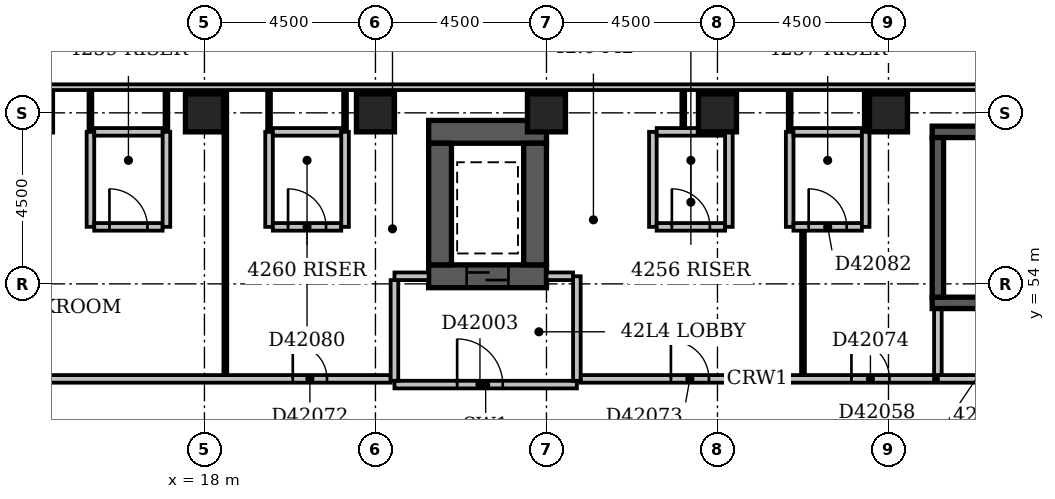
"""IFC4 building model, lengths in metres.
Left out: names, types, materials, properties, quantities, classifications, styles, units other than length and angle.
Written with IfcOpenShell. Run it as: python <this file> out.ifc"""

import sys

from ifc_helpers import new_model, si_unit, direction, frame, frame_2d, origin, origin_2d, place, context, subcontext, project, spatial, rectangle, extrude, element, fill, save


model = new_model("IFC4")
c1 = context("Model", 3, precision=1e-05, world=origin(), true_north=direction((0.0, 1.0)))
c2 = subcontext(c1, "Body", "Model", "MODEL_VIEW")
j1 = project(units=[si_unit("LENGTHUNIT", "METRE"), si_unit("PLANEANGLEUNIT", "RADIAN")], contexts=[c1])
p1 = place(None, origin())
s1 = spatial("IfcSite", under=j1, at=p1, CompositionType="ELEMENT")
p2 = place(p1, origin())
s2 = spatial("IfcBuilding", under=s1, at=p2, CompositionType="ELEMENT")
p3 = place(p2, frame((0.0, 0.0, 166.4)))
s3 = spatial("IfcBuildingStorey", under=s2, at=p3, CompositionType="ELEMENT", Elevation=166.4)
p4 = place(p3, frame((23.9, 54.2, -0.3), z_axis=(0.0, 0.0, 1.0), x_axis=(1.0, 0.0, 0.0)))
e1 = element("IfcWall", 1, at=p4, inside=s3, PredefinedType="SHEAR", context=c2, shape_type="SweptSolid", body=[
    extrude(rectangle(XDim=3.1, YDim=0.6, at=frame_2d((1.55, 0.0))), origin(), (0.0, 0.0, 1.0), 3.6),
])
p5 = place(p4, frame((1.0, 0.0, 0.3)))
e2 = element("IfcOpeningElement", 2, at=p5, cuts=e1, PredefinedType="OPENING", context=c2, shape_type="SweptSolid", body=[
    extrude(rectangle(XDim=1.1, YDim=2.1, at=frame_2d((0.55, 1.05))), frame((0.0, 0.312, 0.0), z_axis=(0.0, -1.0, 0.0), x_axis=(1.0, 0.0, 0.0)), (0.0, 0.0, 1.0), 0.624),
])
p6 = place(p3, frame((23.9, 58.0, -0.3), z_axis=(0.0, 0.0, 1.0), x_axis=(1.0, 0.0, 0.0)))
e3 = element("IfcWall", 3, at=p6, inside=s3, PredefinedType="SHEAR", context=c2, shape_type="SweptSolid", body=[
    extrude(rectangle(XDim=3.1, YDim=0.6, at=frame_2d((1.55, 0.0))), origin(), (0.0, 0.0, 1.0), 3.6),
])
for number, where, z_axis, x_axis in (
    (4, (24.2, 54.5, -0.3), (0.0, 0.0, 1.0), (0.0, 1.0, 0.0)),
    (5, (26.7, 54.5, -0.3), (0.0, 0.0, 1.0), (0.0, 1.0, 0.0)),
):
    element("IfcWall", number, at=place(p3, frame(where, z_axis=z_axis, x_axis=x_axis)), inside=s3, PredefinedType="SHEAR", context=c2, shape_type="SweptSolid", body=[
        extrude(rectangle(XDim=3.2, YDim=0.6, at=frame_2d((1.6, 0.0))), origin(), (0.0, 0.0, 1.0), 3.6),
    ])
p7 = place(p3, frame((37.15, 53.5, -0.3), z_axis=(0.0, 0.0, 1.0), x_axis=(1.0, 0.0, 0.0)))
e6 = element("IfcWall", 6, at=p7, inside=s3, PredefinedType="SHEAR", context=c2, shape_type="SweptSolid", body=[
    extrude(rectangle(XDim=7.0, YDim=0.3, at=frame_2d((3.5, 0.0))), origin(), (0.0, 0.0, 1.0), 3.6),
])
p8 = place(p7, frame((5.58, 0.0, 0.3)))
e7 = element("IfcOpeningElement", 7, at=p8, cuts=e6, PredefinedType="OPENING", context=c2, shape_type="SweptSolid", body=[
    extrude(rectangle(XDim=1.1, YDim=2.1, at=frame_2d((0.55, 1.05))), frame((0.0, 0.162, 0.0), z_axis=(0.0, -1.0, 0.0), x_axis=(1.0, 0.0, 0.0)), (0.0, 0.0, 1.0), 0.324),
])
p9 = place(p3, frame((37.15, 58.0, -0.3), z_axis=(0.0, 0.0, 1.0), x_axis=(1.0, 0.0, 0.0)))
e8 = element("IfcWall", 8, at=p9, inside=s3, PredefinedType="SHEAR", context=c2, shape_type="SweptSolid", body=[
    extrude(rectangle(XDim=7.35, YDim=0.3, at=frame_2d((3.675, 0.0))), origin(), (0.0, 0.0, 1.0), 3.6),
])
p10 = place(p3, frame((37.3, 53.65, -0.3), z_axis=(0.0, 0.0, 1.0), x_axis=(0.0, 1.0, 0.0)))
e9 = element("IfcWall", 9, at=p10, inside=s3, PredefinedType="SHEAR", context=c2, shape_type="SweptSolid", body=[
    extrude(rectangle(XDim=4.2, YDim=0.3, at=frame_2d((2.1, 0.0))), origin(), (0.0, 0.0, 1.0), 3.6),
])
for number, where, z_axis, x_axis in (
    (10, (18.0, 58.5, -0.3), (0.0, 0.0, 1.0), (1.0, 0.0, 0.0)),
    (11, (22.5, 58.5, -0.3), (0.0, 0.0, 1.0), (1.0, 0.0, 0.0)),
    (12, (27.0, 58.5, -0.3), (0.0, 0.0, 1.0), (1.0, 0.0, 0.0)),
    (13, (31.5, 58.5, -0.3), (0.0, 0.0, 1.0), (1.0, 0.0, 0.0)),
    (14, (36.0, 58.5, -0.3), (0.0, 0.0, 1.0), (1.0, 0.0, 0.0)),
):
    element("IfcColumn", number, at=place(p3, frame(where, z_axis=z_axis, x_axis=x_axis)), inside=s3, PredefinedType="COLUMN", context=c2, shape_type="SweptSolid", body=[
        extrude(rectangle(XDim=1.0, YDim=1.0, at=origin_2d()), origin(), (0.0, 0.0, 1.0), 3.6),
    ])
p11 = place(p3, frame((68.1, 59.175, 0.0), z_axis=(0.0, 0.0, 1.0), x_axis=(-1.0, 0.0, 0.0)))
e15 = element("IfcWall", 15, at=p11, inside=s3, PredefinedType="STANDARD", context=c2, shape_type="SweptSolid", body=[
    extrude(rectangle(XDim=68.85, YDim=0.15, at=frame_2d((34.425, 0.0))), origin(), (0.0, 0.0, 1.0), 2.7),
])
p12 = place(p11, frame((1.65, 0.0, 0.6)))
e16 = element("IfcOpeningElement", 16, at=p12, cuts=e15, PredefinedType="OPENING", context=c2, shape_type="SweptSolid", body=[
    extrude(rectangle(XDim=2.4, YDim=1.8, at=frame_2d((1.2, 0.9))), frame((0.0, 0.087, 0.0), z_axis=(0.0, -1.0, 0.0), x_axis=(1.0, 0.0, 0.0)), (0.0, 0.0, 1.0), 0.174),
])
p13 = place(p11, frame((6.15, 0.0, 0.6)))
e17 = element("IfcOpeningElement", 17, at=p13, cuts=e15, PredefinedType="OPENING", context=c2, shape_type="SweptSolid", body=[
    extrude(rectangle(XDim=2.4, YDim=1.8, at=frame_2d((1.2, 0.9))), frame((0.0, 0.087, 0.0), z_axis=(0.0, -1.0, 0.0), x_axis=(1.0, 0.0, 0.0)), (0.0, 0.0, 1.0), 0.174),
])
p14 = place(p11, frame((19.65, 0.0, 0.6)))
e18 = element("IfcOpeningElement", 18, at=p14, cuts=e15, PredefinedType="OPENING", context=c2, shape_type="SweptSolid", body=[
    extrude(rectangle(XDim=2.4, YDim=1.8, at=frame_2d((1.2, 0.9))), frame((0.0, 0.087, 0.0), z_axis=(0.0, -1.0, 0.0), x_axis=(1.0, 0.0, 0.0)), (0.0, 0.0, 1.0), 0.174),
])
p15 = place(p3, frame((23.0, 51.35, 0.0), z_axis=(0.0, 0.0, 1.0), x_axis=(1.0, 0.0, 0.0)))
e19 = element("IfcWall", 19, at=p15, inside=s3, PredefinedType="PARTITIONING", context=c2, shape_type="SweptSolid", body=[
    extrude(rectangle(XDim=4.8, YDim=0.2, at=frame_2d((2.4, 0.0))), origin(), (0.0, 0.0, 1.0), 3.3),
])
p16 = place(p15, frame((1.65, 0.0, 0.0)))
e20 = element("IfcOpeningElement", 20, at=p16, cuts=e19, PredefinedType="OPENING", context=c2, shape_type="SweptSolid", body=[
    extrude(rectangle(XDim=1.2, YDim=2.1, at=frame_2d((0.6, 1.05))), frame((0.0, 0.112, 0.0), z_axis=(0.0, -1.0, 0.0), x_axis=(1.0, 0.0, 0.0)), (0.0, 0.0, 1.0), 0.224),
])
p17 = place(p3, frame((27.8, 51.45, 0.0), z_axis=(0.0, 0.0, 1.0), x_axis=(0.0, 1.0, 0.0)))
e21 = element("IfcWall", 21, at=p17, inside=s3, PredefinedType="PARTITIONING", context=c2, shape_type="SweptSolid", body=[
    extrude(rectangle(XDim=2.75, YDim=0.2, at=frame_2d((1.375, 0.0))), origin(), (0.0, 0.0, 1.0), 3.3),
])
p18 = place(p3, frame((23.0, 54.2, 0.0), z_axis=(0.0, 0.0, 1.0), x_axis=(1.0, 0.0, 0.0)))
e22 = element("IfcWall", 22, at=p18, inside=s3, PredefinedType="PARTITIONING", context=c2, shape_type="SweptSolid", body=[
    extrude(rectangle(XDim=0.9, YDim=0.2, at=frame_2d((0.45, 0.0))), origin(), (0.0, 0.0, 1.0), 3.3),
])
p19 = place(p3, frame((27.0, 54.2, 0.0), z_axis=(0.0, 0.0, 1.0), x_axis=(1.0, 0.0, 0.0)))
e23 = element("IfcWall", 23, at=p19, inside=s3, PredefinedType="PARTITIONING", context=c2, shape_type="SweptSolid", body=[
    extrude(rectangle(XDim=0.7, YDim=0.2, at=frame_2d((0.35, 0.0))), origin(), (0.0, 0.0, 1.0), 3.3),
])
p20 = place(p3, frame((23.0, 51.45, 0.0), z_axis=(0.0, 0.0, 1.0), x_axis=(0.0, 1.0, 0.0)))
e24 = element("IfcWall", 24, at=p20, inside=s3, PredefinedType="PARTITIONING", context=c2, shape_type="SweptSolid", body=[
    extrude(rectangle(XDim=2.65, YDim=0.2, at=frame_2d((1.325, 0.0))), origin(), (0.0, 0.0, 1.0), 3.3),
])
p21 = place(p3, frame((37.3, 51.5, 0.0), z_axis=(0.0, 0.0, 1.0), x_axis=(1.0, 0.0, 0.0)))
e25 = element("IfcWall", 25, at=p21, inside=s3, PredefinedType="PARTITIONING", context=c2, shape_type="SweptSolid", body=[
    extrude(rectangle(XDim=6.7, YDim=0.2, at=frame_2d((3.35, 0.0))), origin(), (0.0, 0.0, 1.0), 3.3),
])
p22 = place(p21, frame((2.75, 0.0, 0.0)))
e26 = element("IfcOpeningElement", 26, at=p22, cuts=e25, PredefinedType="OPENING", context=c2, shape_type="SweptSolid", body=[
    extrude(rectangle(XDim=1.2, YDim=2.1, at=frame_2d((0.6, 1.05))), frame((0.0, 0.112, 0.0), z_axis=(0.0, -1.0, 0.0), x_axis=(1.0, 0.0, 0.0)), (0.0, 0.0, 1.0), 0.224),
])
p23 = place(p3, frame((37.3, 51.6, 0.0), z_axis=(0.0, 0.0, 1.0), x_axis=(0.0, 1.0, 0.0)))
e27 = element("IfcWall", 27, at=p23, inside=s3, PredefinedType="PARTITIONING", context=c2, shape_type="SweptSolid", body=[
    extrude(rectangle(XDim=1.73, YDim=0.2, at=frame_2d((0.865, 0.0))), origin(), (0.0, 0.0, 1.0), 3.3),
])
p24 = place(p3, frame((7.6, 51.5, 0.0), z_axis=(0.0, 0.0, 1.0), x_axis=(1.0, 0.0, 0.0)))
e28 = element("IfcWall", 28, at=p24, inside=s3, PredefinedType="PARTITIONING", context=c2, shape_type="SweptSolid", body=[
    extrude(rectangle(XDim=15.3, YDim=0.2, at=frame_2d((7.65, 0.0))), origin(), (0.0, 0.0, 1.0), 3.3),
])
p25 = place(p24, frame((4.975, 0.0, 0.0)))
e29 = element("IfcOpeningElement", 29, at=p25, cuts=e28, PredefinedType="OPENING", context=c2, shape_type="SweptSolid", body=[
    extrude(rectangle(XDim=0.9, YDim=2.1, at=frame_2d((0.45, 1.05))), frame((0.0, 0.112, 0.0), z_axis=(0.0, -1.0, 0.0), x_axis=(1.0, 0.0, 0.0)), (0.0, 0.0, 1.0), 0.224),
])
p26 = place(p24, frame((12.725, 0.0, 0.0)))
e30 = element("IfcOpeningElement", 30, at=p26, cuts=e28, PredefinedType="OPENING", context=c2, shape_type="SweptSolid", body=[
    extrude(rectangle(XDim=0.9, YDim=2.1, at=frame_2d((0.45, 1.05))), frame((0.0, 0.112, 0.0), z_axis=(0.0, -1.0, 0.0), x_axis=(1.0, 0.0, 0.0)), (0.0, 0.0, 1.0), 0.224),
])
p27 = place(p3, frame((27.9, 51.5, 0.0), z_axis=(0.0, 0.0, 1.0), x_axis=(1.0, 0.0, 0.0)))
e31 = element("IfcWall", 31, at=p27, inside=s3, PredefinedType="PARTITIONING", context=c2, shape_type="SweptSolid", body=[
    extrude(rectangle(XDim=9.3, YDim=0.2, at=frame_2d((4.65, 0.0))), origin(), (0.0, 0.0, 1.0), 3.3),
])
p28 = place(p27, frame((2.375, 0.0, 0.0)))
e32 = element("IfcOpeningElement", 32, at=p28, cuts=e31, PredefinedType="OPENING", context=c2, shape_type="SweptSolid", body=[
    extrude(rectangle(XDim=1.0, YDim=2.1, at=frame_2d((0.5, 1.05))), frame((0.0, 0.112, 0.0), z_axis=(0.0, -1.0, 0.0), x_axis=(1.0, 0.0, 0.0)), (0.0, 0.0, 1.0), 0.224),
])
p29 = place(p27, frame((7.125, 0.0, 0.0)))
e33 = element("IfcOpeningElement", 33, at=p29, cuts=e31, PredefinedType="OPENING", context=c2, shape_type="SweptSolid", body=[
    extrude(rectangle(XDim=1.0, YDim=2.1, at=frame_2d((0.5, 1.05))), frame((0.0, 0.112, 0.0), z_axis=(0.0, -1.0, 0.0), x_axis=(1.0, 0.0, 0.0)), (0.0, 0.0, 1.0), 0.224),
])
p30 = place(p3, frame((18.55, 51.6, 0.0), z_axis=(0.0, 0.0, 1.0), x_axis=(0.0, 1.0, 0.0)))
e34 = element("IfcWall", 34, at=p30, inside=s3, PredefinedType="PARTITIONING", context=c2, shape_type="SweptSolid", body=[
    extrude(rectangle(XDim=7.5, YDim=0.1, at=frame_2d((3.75, 0.0))), origin(), (0.0, 0.0, 1.0), 3.3),
])
p31 = place(p3, frame((33.75, 51.6, 0.0), z_axis=(0.0, 0.0, 1.0), x_axis=(0.0, 1.0, 0.0)))
e35 = element("IfcWall", 35, at=p31, inside=s3, PredefinedType="PARTITIONING", context=c2, shape_type="SweptSolid", body=[
    extrude(rectangle(XDim=3.8, YDim=0.1, at=frame_2d((1.9, 0.0))), origin(), (0.0, 0.0, 1.0), 3.3),
])
p32 = place(p3, frame((15.0, 55.5, 0.0), z_axis=(0.0, 0.0, 1.0), x_axis=(0.0, 1.0, 0.0)))
e36 = element("IfcWall", 36, at=p32, inside=s3, PredefinedType="PARTITIONING", context=c2, shape_type="SweptSolid", body=[
    extrude(rectangle(XDim=2.5, YDim=0.2, at=frame_2d((1.25, 0.0))), origin(), (0.0, 0.0, 1.0), 3.3),
])
p33 = place(p3, frame((15.1, 55.5, 0.0), z_axis=(0.0, 0.0, 1.0), x_axis=(1.0, 0.0, 0.0)))
e37 = element("IfcWall", 37, at=p33, inside=s3, PredefinedType="PARTITIONING", context=c2, shape_type="SweptSolid", body=[
    extrude(rectangle(XDim=1.8, YDim=0.2, at=frame_2d((0.9, 0.0))), origin(), (0.0, 0.0, 1.0), 3.3),
])
p34 = place(p33, frame((0.4, 0.0, 0.0)))
e38 = element("IfcOpeningElement", 38, at=p34, cuts=e37, PredefinedType="OPENING", context=c2, shape_type="SweptSolid", body=[
    extrude(rectangle(XDim=1.0, YDim=2.1, at=frame_2d((0.5, 1.05))), frame((0.0, 0.112, 0.0), z_axis=(0.0, -1.0, 0.0), x_axis=(1.0, 0.0, 0.0)), (0.0, 0.0, 1.0), 0.224),
])
for number, where, z_axis, x_axis in (
    (39, (17.0, 55.5, 0.0), (0.0, 0.0, 1.0), (0.0, 1.0, 0.0)),
    (40, (19.7, 55.5, 0.0), (0.0, 0.0, 1.0), (0.0, 1.0, 0.0)),
):
    element("IfcWall", number, at=place(p3, frame(where, z_axis=z_axis, x_axis=x_axis)), inside=s3, PredefinedType="PARTITIONING", context=c2, shape_type="SweptSolid", body=[
        extrude(rectangle(XDim=2.5, YDim=0.2, at=frame_2d((1.25, 0.0))), origin(), (0.0, 0.0, 1.0), 3.3),
    ])
p35 = place(p3, frame((19.8, 55.5, 0.0), z_axis=(0.0, 0.0, 1.0), x_axis=(1.0, 0.0, 0.0)))
e41 = element("IfcWall", 41, at=p35, inside=s3, PredefinedType="PARTITIONING", context=c2, shape_type="SweptSolid", body=[
    extrude(rectangle(XDim=1.8, YDim=0.2, at=frame_2d((0.9, 0.0))), origin(), (0.0, 0.0, 1.0), 3.3),
])
p36 = place(p35, frame((0.4, 0.0, 0.0)))
e42 = element("IfcOpeningElement", 42, at=p36, cuts=e41, PredefinedType="OPENING", context=c2, shape_type="SweptSolid", body=[
    extrude(rectangle(XDim=1.0, YDim=2.1, at=frame_2d((0.5, 1.05))), frame((0.0, 0.112, 0.0), z_axis=(0.0, -1.0, 0.0), x_axis=(1.0, 0.0, 0.0)), (0.0, 0.0, 1.0), 0.224),
])
for number, where, z_axis, x_axis in (
    (43, (21.7, 55.5, 0.0), (0.0, 0.0, 1.0), (0.0, 1.0, 0.0)),
    (44, (29.8, 55.5, 0.0), (0.0, 0.0, 1.0), (0.0, 1.0, 0.0)),
):
    element("IfcWall", number, at=place(p3, frame(where, z_axis=z_axis, x_axis=x_axis)), inside=s3, PredefinedType="PARTITIONING", context=c2, shape_type="SweptSolid", body=[
        extrude(rectangle(XDim=2.5, YDim=0.2, at=frame_2d((1.25, 0.0))), origin(), (0.0, 0.0, 1.0), 3.3),
    ])
p37 = place(p3, frame((29.9, 55.5, 0.0), z_axis=(0.0, 0.0, 1.0), x_axis=(1.0, 0.0, 0.0)))
e45 = element("IfcWall", 45, at=p37, inside=s3, PredefinedType="PARTITIONING", context=c2, shape_type="SweptSolid", body=[
    extrude(rectangle(XDim=1.8, YDim=0.2, at=frame_2d((0.9, 0.0))), origin(), (0.0, 0.0, 1.0), 3.3),
])
p38 = place(p37, frame((0.4, 0.0, 0.0)))
e46 = element("IfcOpeningElement", 46, at=p38, cuts=e45, PredefinedType="OPENING", context=c2, shape_type="SweptSolid", body=[
    extrude(rectangle(XDim=1.0, YDim=2.1, at=frame_2d((0.5, 1.05))), frame((0.0, 0.112, 0.0), z_axis=(0.0, -1.0, 0.0), x_axis=(1.0, 0.0, 0.0)), (0.0, 0.0, 1.0), 0.224),
])
for number, where, z_axis, x_axis in (
    (47, (31.8, 55.5, 0.0), (0.0, 0.0, 1.0), (0.0, 1.0, 0.0)),
    (48, (33.4, 55.5, 0.0), (0.0, 0.0, 1.0), (0.0, 1.0, 0.0)),
):
    element("IfcWall", number, at=place(p3, frame(where, z_axis=z_axis, x_axis=x_axis)), inside=s3, PredefinedType="PARTITIONING", context=c2, shape_type="SweptSolid", body=[
        extrude(rectangle(XDim=2.5, YDim=0.2, at=frame_2d((1.25, 0.0))), origin(), (0.0, 0.0, 1.0), 3.3),
    ])
p39 = place(p3, frame((33.5, 55.5, 0.0), z_axis=(0.0, 0.0, 1.0), x_axis=(1.0, 0.0, 0.0)))
e49 = element("IfcWall", 49, at=p39, inside=s3, PredefinedType="PARTITIONING", context=c2, shape_type="SweptSolid", body=[
    extrude(rectangle(XDim=1.8, YDim=0.2, at=frame_2d((0.9, 0.0))), origin(), (0.0, 0.0, 1.0), 3.3),
])
p40 = place(p39, frame((0.4, 0.0, 0.0)))
e50 = element("IfcOpeningElement", 50, at=p40, cuts=e49, PredefinedType="OPENING", context=c2, shape_type="SweptSolid", body=[
    extrude(rectangle(XDim=1.0, YDim=2.1, at=frame_2d((0.5, 1.05))), frame((0.0, 0.112, 0.0), z_axis=(0.0, -1.0, 0.0), x_axis=(1.0, 0.0, 0.0)), (0.0, 0.0, 1.0), 0.224),
])
p41 = place(p3, frame((35.4, 55.5, 0.0), z_axis=(0.0, 0.0, 1.0), x_axis=(0.0, 1.0, 0.0)))
e51 = element("IfcWall", 51, at=p41, inside=s3, PredefinedType="PARTITIONING", context=c2, shape_type="SweptSolid", body=[
    extrude(rectangle(XDim=2.5, YDim=0.2, at=frame_2d((1.25, 0.0))), origin(), (0.0, 0.0, 1.0), 2.4),
])
p42 = place(p3, frame((15.0, 58.0, 0.0), z_axis=(0.0, 0.0, 1.0), x_axis=(0.0, 1.0, 0.0)))
e52 = element("IfcWall", 52, at=p42, inside=s3, PredefinedType="PARTITIONING", context=c2, shape_type="SweptSolid", body=[
    extrude(rectangle(XDim=1.1, YDim=0.1, at=frame_2d((0.55, 0.0))), origin(), (0.0, 0.0, 1.0), 3.3),
])
p43 = place(p3, frame((15.1, 58.0, 0.0), z_axis=(0.0, 0.0, 1.0), x_axis=(1.0, 0.0, 0.0)))
e53 = element("IfcWall", 53, at=p43, inside=s3, PredefinedType="PARTITIONING", context=c2, shape_type="SweptSolid", body=[
    extrude(rectangle(XDim=1.8, YDim=0.2, at=frame_2d((0.9, 0.0))), origin(), (0.0, 0.0, 1.0), 3.3),
])
for number, where, z_axis, x_axis in (
    (54, (17.0, 58.0, 0.0), (0.0, 0.0, 1.0), (0.0, 1.0, 0.0)),
    (55, (19.7, 58.0, 0.0), (0.0, 0.0, 1.0), (0.0, 1.0, 0.0)),
):
    element("IfcWall", number, at=place(p3, frame(where, z_axis=z_axis, x_axis=x_axis)), inside=s3, PredefinedType="PARTITIONING", context=c2, shape_type="SweptSolid", body=[
        extrude(rectangle(XDim=1.1, YDim=0.1, at=frame_2d((0.55, 0.0))), origin(), (0.0, 0.0, 1.0), 3.3),
    ])
p44 = place(p3, frame((19.8, 58.0, 0.0), z_axis=(0.0, 0.0, 1.0), x_axis=(1.0, 0.0, 0.0)))
e56 = element("IfcWall", 56, at=p44, inside=s3, PredefinedType="PARTITIONING", context=c2, shape_type="SweptSolid", body=[
    extrude(rectangle(XDim=1.8, YDim=0.2, at=frame_2d((0.9, 0.0))), origin(), (0.0, 0.0, 1.0), 3.3),
])
p45 = place(p3, frame((21.7, 58.0, 0.0), z_axis=(0.0, 0.0, 1.0), x_axis=(0.0, 1.0, 0.0)))
e57 = element("IfcWall", 57, at=p45, inside=s3, PredefinedType="PARTITIONING", context=c2, shape_type="SweptSolid", body=[
    extrude(rectangle(XDim=1.1, YDim=0.1, at=frame_2d((0.55, 0.0))), origin(), (0.0, 0.0, 1.0), 3.3),
])
p46 = place(p3, frame((29.9, 58.0, 0.0), z_axis=(0.0, 0.0, 1.0), x_axis=(1.0, 0.0, 0.0)))
e58 = element("IfcWall", 58, at=p46, inside=s3, PredefinedType="PARTITIONING", context=c2, shape_type="SweptSolid", body=[
    extrude(rectangle(XDim=1.8, YDim=0.2, at=frame_2d((0.9, 0.0))), origin(), (0.0, 0.0, 1.0), 3.3),
])
p47 = place(p3, frame((33.4, 58.0, 0.0), z_axis=(0.0, 0.0, 1.0), x_axis=(0.0, 1.0, 0.0)))
e59 = element("IfcWall", 59, at=p47, inside=s3, PredefinedType="PARTITIONING", context=c2, shape_type="SweptSolid", body=[
    extrude(rectangle(XDim=1.1, YDim=0.1, at=frame_2d((0.55, 0.0))), origin(), (0.0, 0.0, 1.0), 3.3),
])
p48 = place(p3, frame((33.5, 58.0, 0.0), z_axis=(0.0, 0.0, 1.0), x_axis=(1.0, 0.0, 0.0)))
e60 = element("IfcWall", 60, at=p48, inside=s3, PredefinedType="PARTITIONING", context=c2, shape_type="SweptSolid", body=[
    extrude(rectangle(XDim=1.8, YDim=0.2, at=frame_2d((0.9, 0.0))), origin(), (0.0, 0.0, 1.0), 3.3),
])
p49 = place(p3, frame((35.4, 58.0, 0.0), z_axis=(0.0, 0.0, 1.0), x_axis=(0.0, 1.0, 0.0)))
e61 = element("IfcWall", 61, at=p49, inside=s3, PredefinedType="PARTITIONING", context=c2, shape_type="SweptSolid", body=[
    extrude(rectangle(XDim=1.1, YDim=0.1, at=frame_2d((0.55, 0.0))), origin(), (0.0, 0.0, 1.0), 2.4),
])
p50 = place(p3, frame((30.6, 58.1, 0.0), z_axis=(0.0, 0.0, 1.0), x_axis=(0.0, 1.0, 0.0)))
e62 = element("IfcWall", 62, at=p50, inside=s3, PredefinedType="PARTITIONING", context=c2, shape_type="SweptSolid", body=[
    extrude(rectangle(XDim=1.0, YDim=0.1, at=frame_2d((0.5, 0.0))), origin(), (0.0, 0.0, 1.0), 3.3),
])
p51 = place(p16, origin())
e63 = element("IfcDoor", 63, at=p51, inside=s3, OperationType="SINGLE_SWING_LEFT", PredefinedType="DOOR", context=c2, shape_type="SweptSolid", body=[
    extrude(rectangle(XDim=1.2, YDim=2.1, at=frame_2d((0.6, 1.05))), frame((0.0, 0.025, 0.0), z_axis=(0.0, -1.0, 0.0), x_axis=(1.0, 0.0, 0.0)), (0.0, 0.0, 1.0), 0.05),
])
fill(e20, e63)
p52 = place(p5, origin())
e64 = element("IfcDoor", 64, at=p52, inside=s3, OperationType="SLIDING_TO_LEFT", PredefinedType="DOOR", context=c2, shape_type="SweptSolid", body=[
    extrude(rectangle(XDim=1.1, YDim=2.1, at=frame_2d((0.55, 1.05))), frame((0.0, 0.025, 0.0), z_axis=(0.0, -1.0, 0.0), x_axis=(1.0, 0.0, 0.0)), (0.0, 0.0, 1.0), 0.05),
])
fill(e2, e64)
p53 = place(p26, origin())
e65 = element("IfcDoor", 65, at=p53, inside=s3, OperationType="SINGLE_SWING_LEFT", PredefinedType="DOOR", context=c2, shape_type="SweptSolid", body=[
    extrude(rectangle(XDim=0.9, YDim=2.1, at=frame_2d((0.45, 1.05))), frame((0.0, 0.025, 0.0), z_axis=(0.0, -1.0, 0.0), x_axis=(1.0, 0.0, 0.0)), (0.0, 0.0, 1.0), 0.05),
])
fill(e30, e65)
p54 = place(p28, origin())
e66 = element("IfcDoor", 66, at=p54, inside=s3, OperationType="SINGLE_SWING_LEFT", PredefinedType="DOOR", context=c2, shape_type="SweptSolid", body=[
    extrude(rectangle(XDim=1.0, YDim=2.1, at=frame_2d((0.5, 1.05))), frame((0.0, 0.025, 0.0), z_axis=(0.0, -1.0, 0.0), x_axis=(1.0, 0.0, 0.0)), (0.0, 0.0, 1.0), 0.05),
])
fill(e32, e66)
p55 = place(p29, origin())
e67 = element("IfcDoor", 67, at=p55, inside=s3, OperationType="SINGLE_SWING_LEFT", PredefinedType="DOOR", context=c2, shape_type="SweptSolid", body=[
    extrude(rectangle(XDim=1.0, YDim=2.1, at=frame_2d((0.5, 1.05))), frame((0.0, 0.025, 0.0), z_axis=(0.0, -1.0, 0.0), x_axis=(1.0, 0.0, 0.0)), (0.0, 0.0, 1.0), 0.05),
])
fill(e33, e67)
p56 = place(p34, origin())
e68 = element("IfcDoor", 68, at=p56, inside=s3, OperationType="SINGLE_SWING_LEFT", PredefinedType="DOOR", context=c2, shape_type="SweptSolid", body=[
    extrude(rectangle(XDim=1.0, YDim=2.1, at=frame_2d((0.5, 1.05))), frame((0.0, 0.025, 0.0), z_axis=(0.0, -1.0, 0.0), x_axis=(1.0, 0.0, 0.0)), (0.0, 0.0, 1.0), 0.05),
])
fill(e38, e68)
p57 = place(p36, origin())
e69 = element("IfcDoor", 69, at=p57, inside=s3, OperationType="SINGLE_SWING_LEFT", PredefinedType="DOOR", context=c2, shape_type="SweptSolid", body=[
    extrude(rectangle(XDim=1.0, YDim=2.1, at=frame_2d((0.5, 1.05))), frame((0.0, 0.025, 0.0), z_axis=(0.0, -1.0, 0.0), x_axis=(1.0, 0.0, 0.0)), (0.0, 0.0, 1.0), 0.05),
])
fill(e42, e69)
p58 = place(p38, origin())
e70 = element("IfcDoor", 70, at=p58, inside=s3, OperationType="SINGLE_SWING_LEFT", PredefinedType="DOOR", context=c2, shape_type="SweptSolid", body=[
    extrude(rectangle(XDim=1.0, YDim=2.1, at=frame_2d((0.5, 1.05))), frame((0.0, 0.025, 0.0), z_axis=(0.0, -1.0, 0.0), x_axis=(1.0, 0.0, 0.0)), (0.0, 0.0, 1.0), 0.05),
])
fill(e46, e70)
p59 = place(p40, origin())
e71 = element("IfcDoor", 71, at=p59, inside=s3, OperationType="SINGLE_SWING_LEFT", PredefinedType="DOOR", context=c2, shape_type="SweptSolid", body=[
    extrude(rectangle(XDim=1.0, YDim=2.1, at=frame_2d((0.5, 1.05))), frame((0.0, 0.025, 0.0), z_axis=(0.0, -1.0, 0.0), x_axis=(1.0, 0.0, 0.0)), (0.0, 0.0, 1.0), 0.05),
])
fill(e50, e71)
save(model, sys.argv[1])
